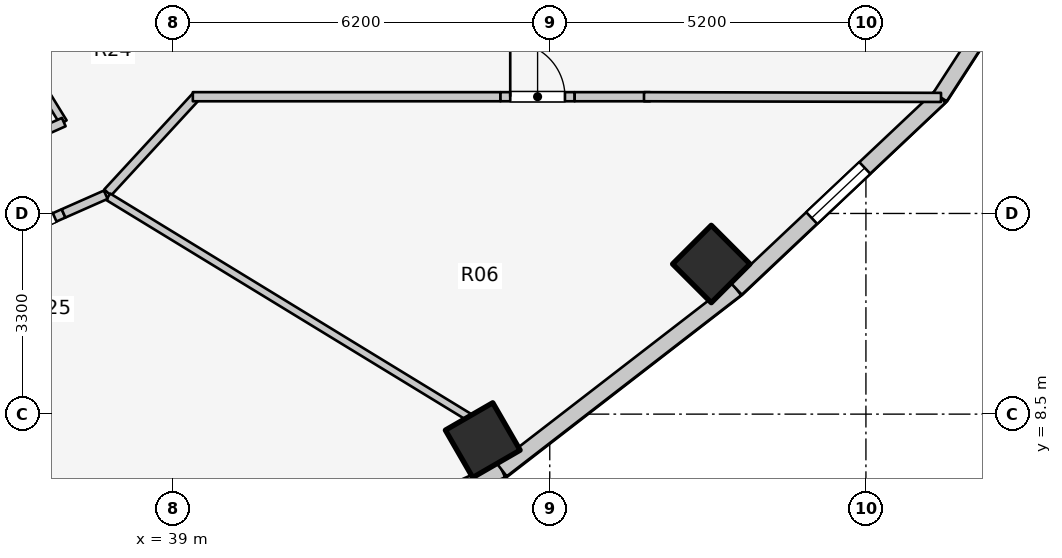
"""IFC4 building model, lengths in metres.
Left out: names, types, materials, properties, quantities, classifications, styles, units other than length and angle.
Written with IfcOpenShell. Run it as: python <this file> out.ifc"""

import sys

from ifc_helpers import new_model, si_unit, direction, frame, frame_2d, origin, origin_2d, place, context, subcontext, project, spatial, rectangle, extrude, element, fill, save


model = new_model("IFC4")
c1 = context("Model", 3, precision=1e-05, world=origin(), true_north=direction((0.0, 1.0)))
c2 = subcontext(c1, "Body", "Model", "MODEL_VIEW")
j1 = project(units=[si_unit("LENGTHUNIT", "METRE"), si_unit("PLANEANGLEUNIT", "RADIAN")], contexts=[c1])
p1 = place(None, origin())
s1 = spatial("IfcSite", under=j1, at=p1, CompositionType="ELEMENT")
p2 = place(p1, origin())
s2 = spatial("IfcBuilding", under=s1, at=p2, CompositionType="ELEMENT")
p3 = place(p2, frame((0.0, 0.0, 177.7)))
s3 = spatial("IfcBuildingStorey", under=s2, at=p3, CompositionType="ELEMENT", Elevation=177.7)
for number, where, z_axis, x_axis in (
    (1, (44.098, 8.072, 0.0), (0.0, 0.0, 1.0), (0.5, -0.866, 0.0)),
    (2, (47.857, 10.969, 0.0), (0.0, 0.0, 1.0), (0.707, -0.707, 0.0)),
):
    element("IfcColumn", number, at=place(p3, frame(where, z_axis=z_axis, x_axis=x_axis)), inside=s3, PredefinedType="COLUMN", context=c2, shape_type="SweptSolid", body=[
        extrude(rectangle(XDim=0.9, YDim=0.9, at=origin_2d()), origin(), (0.0, 0.0, 1.0), 3.1),
    ])
p4 = place(p3, frame((39.365, 5.315, 0.0), z_axis=(0.0, 0.0, 1.0), x_axis=(0.912353637112, 0.409403029847, 0.0)))
e3 = element("IfcWall", 3, at=p4, inside=s3, PredefinedType="STANDARD", context=c2, shape_type="SweptSolid", body=[
    extrude(rectangle(XDim=5.533, YDim=0.26, at=frame_2d((2.766, 0.0))), origin(), (0.0, 0.0, 1.0), 1.22),
])
p5 = place(p4, frame((2.167, 0.0, 0.15)))
e4 = element("IfcOpeningElement", 4, at=p5, cuts=e3, PredefinedType="OPENING", context=c2, shape_type="SweptSolid", body=[
    extrude(rectangle(XDim=1.2, YDim=0.9, at=frame_2d((0.6, 0.45))), frame((0.0, 0.14, 0.0), z_axis=(0.0, -1.0, 0.0), x_axis=(1.0, 0.0, 0.0)), (0.0, 0.0, 1.0), 0.28),
])
p6 = place(p3, frame((44.413, 7.581, 0.0), z_axis=(0.0, 0.0, 1.0), x_axis=(0.791460185804, 0.611220724687, 0.0)))
e5 = element("IfcWall", 5, at=p6, inside=s3, PredefinedType="STANDARD", context=c2, shape_type="SweptSolid", body=[
    extrude(rectangle(XDim=4.872, YDim=0.26, at=frame_2d((2.436, 0.0))), origin(), (0.0, 0.0, 1.0), 1.22),
])
p7 = place(p3, frame((48.269, 10.559, 0.0), z_axis=(0.0, 0.0, 1.0), x_axis=(0.727667301037, 0.68593024354, 0.0)))
e6 = element("IfcWall", 6, at=p7, inside=s3, PredefinedType="STANDARD", context=c2, shape_type="SweptSolid", body=[
    extrude(rectangle(XDim=4.604, YDim=0.26, at=frame_2d((2.302, 0.0))), origin(), (0.0, 0.0, 1.0), 1.22),
])
p8 = place(p7, frame((1.702, 0.0, 0.15)))
e7 = element("IfcOpeningElement", 7, at=p8, cuts=e6, PredefinedType="OPENING", context=c2, shape_type="SweptSolid", body=[
    extrude(rectangle(XDim=1.2, YDim=0.9, at=frame_2d((0.6, 0.45))), frame((0.0, 0.14, 0.0), z_axis=(0.0, -1.0, 0.0), x_axis=(1.0, 0.0, 0.0)), (0.0, 0.0, 1.0), 0.28),
])
p9 = place(p3, frame((51.619, 13.716, 0.0), z_axis=(0.0, 0.0, 1.0), x_axis=(0.543358984534, 0.839500454989, 0.0)))
e8 = element("IfcWall", 8, at=p9, inside=s3, PredefinedType="STANDARD", context=c2, shape_type="SweptSolid", body=[
    extrude(rectangle(XDim=4.511, YDim=0.26, at=frame_2d((2.256, 0.0))), origin(), (0.0, 0.0, 1.0), 1.22),
])
p10 = place(p9, frame((1.656, 0.0, 0.15)))
e9 = element("IfcOpeningElement", 9, at=p10, cuts=e8, PredefinedType="OPENING", context=c2, shape_type="SweptSolid", body=[
    extrude(rectangle(XDim=1.2, YDim=0.9, at=frame_2d((0.6, 0.45))), frame((0.0, 0.14, 0.0), z_axis=(0.0, -1.0, 0.0), x_axis=(1.0, 0.0, 0.0)), (0.0, 0.0, 1.0), 0.28),
])
p11 = place(p3, frame((37.928, 12.144, 0.0), z_axis=(0.0, 0.0, 1.0), x_axis=(0.677579737957, 0.735449317567, 0.0)))
e10 = element("IfcWall", 10, at=p11, inside=s3, PredefinedType="PARTITIONING", context=c2, shape_type="SweptSolid", body=[
    extrude(rectangle(XDim=2.173, YDim=0.15, at=frame_2d((1.086, 0.0))), origin(), (0.0, 0.0, 1.0), 2.019),
])
p12 = place(p3, frame((39.33, 13.72, 0.0), z_axis=(0.0, 0.0, 1.0), x_axis=(1.0, 0.0, 0.0)))
e11 = element("IfcWall", 11, at=p12, inside=s3, PredefinedType="PARTITIONING", context=c2, shape_type="SweptSolid", body=[
    extrude(rectangle(XDim=5.06, YDim=0.15, at=frame_2d((2.53, 0.0))), origin(), (0.0, 0.0, 1.0), 2.019),
])
p13 = place(p3, frame((44.39, 13.72, 0.0), z_axis=(0.0, 0.0, 1.0), x_axis=(1.0, 0.0, 0.0)))
e12 = element("IfcWall", 12, at=p13, inside=s3, PredefinedType="PARTITIONING", context=c2, shape_type="SweptSolid", body=[
    extrude(rectangle(XDim=1.22, YDim=0.15, at=frame_2d((0.61, 0.0))), origin(), (0.0, 0.0, 1.0), 2.575),
])
p14 = place(p13, frame((0.16, 0.0, 0.0)))
e13 = element("IfcOpeningElement", 13, at=p14, cuts=e12, PredefinedType="OPENING", context=c2, shape_type="SweptSolid", body=[
    extrude(rectangle(XDim=0.9, YDim=2.1, at=frame_2d((0.45, 1.05))), frame((0.0, 0.085, 0.0), z_axis=(0.0, -1.0, 0.0), x_axis=(1.0, 0.0, 0.0)), (0.0, 0.0, 1.0), 0.17),
])
p15 = place(p3, frame((45.61, 13.72, 0.0), z_axis=(0.0, 0.0, 1.0), x_axis=(1.0, 0.0, 0.0)))
e14 = element("IfcWall", 14, at=p15, inside=s3, PredefinedType="PARTITIONING", context=c2, shape_type="SweptSolid", body=[
    extrude(rectangle(XDim=1.24, YDim=0.15, at=frame_2d((0.62, 0.0))), origin(), (0.0, 0.0, 1.0), 2.575),
])
p16 = place(p3, frame((46.75, 13.72, 0.0), z_axis=(0.0, 0.0, 1.0), x_axis=(0.999997122315, -0.00239903348, 0.0)))
e15 = element("IfcWall", 15, at=p16, inside=s3, PredefinedType="PARTITIONING", context=c2, shape_type="SweptSolid", body=[
    extrude(rectangle(XDim=4.885, YDim=0.15, at=frame_2d((2.442, 0.0))), origin(), (0.0, 0.0, 1.0), 1.22),
])
p17 = place(p3, frame((35.55, 15.985, 0.0), z_axis=(0.0, 0.0, 1.0), x_axis=(0.523587550846, -0.851971875474, 0.0)))
e16 = element("IfcWall", 16, at=p17, inside=s3, PredefinedType="PARTITIONING", context=c2, shape_type="SweptSolid", body=[
    extrude(rectangle(XDim=3.153, YDim=0.125, at=frame_2d((1.577, 0.0))), origin(), (0.0, 0.0, 1.0), 2.019),
])
p18 = place(p3, frame((36.529, 13.0, 0.0), z_axis=(0.0, 0.0, 1.0), x_axis=(0.913092011598, 0.407753575528, 0.0)))
e17 = element("IfcWall", 17, at=p18, inside=s3, PredefinedType="PARTITIONING", context=c2, shape_type="SweptSolid", body=[
    extrude(rectangle(XDim=0.743, YDim=0.15, at=frame_2d((0.372, 0.0))), origin(), (0.0, 0.0, 1.0), 2.575),
])
p19 = place(p3, frame((37.938, 12.075, 0.0), z_axis=(0.0, 0.0, 1.0), x_axis=(0.853440334679, -0.521190555501, 0.0)))
e18 = element("IfcWall", 18, at=p19, inside=s3, PredefinedType="PARTITIONING", context=c2, shape_type="SweptSolid", body=[
    extrude(rectangle(XDim=6.966, YDim=0.125, at=frame_2d((3.483, 0.0))), origin(), (0.0, 0.0, 1.0), 1.22),
])
p20 = place(p3, frame((35.997, 11.267, 0.0), z_axis=(0.0, 0.0, 1.0), x_axis=(0.914549810084, 0.404473293155, 0.0)))
e19 = element("IfcWall", 19, at=p20, inside=s3, PredefinedType="PARTITIONING", context=c2, shape_type="SweptSolid", body=[
    extrude(rectangle(XDim=1.32, YDim=0.15, at=frame_2d((0.66, 0.0))), origin(), (0.0, 0.0, 1.0), 2.16),
])
p21 = place(p20, frame((0.16, 0.0, 0.0)))
e20 = element("IfcOpeningElement", 20, at=p21, cuts=e19, PredefinedType="OPENING", context=c2, shape_type="SweptSolid", body=[
    extrude(rectangle(XDim=1.0, YDim=2.1, at=frame_2d((0.5, 1.05))), frame((0.0, 0.085, 0.0), z_axis=(0.0, -1.0, 0.0), x_axis=(1.0, 0.0, 0.0)), (0.0, 0.0, 1.0), 0.17),
])
p22 = place(p3, frame((37.204, 11.801, 0.0), z_axis=(0.0, 0.0, 1.0), x_axis=(0.914526186943, 0.404526702945, 0.0)))
e21 = element("IfcWall", 21, at=p22, inside=s3, PredefinedType="PARTITIONING", context=c2, shape_type="SweptSolid", body=[
    extrude(rectangle(XDim=0.759, YDim=0.15, at=frame_2d((0.38, 0.0))), origin(), (0.0, 0.0, 1.0), 2.575),
])
p23 = place(p8, origin())
e22 = element("IfcWindow", 22, at=p23, inside=s3, PartitioningType="SINGLE_PANEL", PredefinedType="WINDOW", context=c2, shape_type="SweptSolid", body=[
    extrude(rectangle(XDim=1.2, YDim=0.9, at=frame_2d((0.6, 0.45))), frame((0.0, 0.03, 0.0), z_axis=(0.0, -1.0, 0.0), x_axis=(1.0, 0.0, 0.0)), (0.0, 0.0, 1.0), 0.06),
])
fill(e7, e22)
p24 = place(p14, origin())
e23 = element("IfcDoor", 23, at=p24, inside=s3, OperationType="SINGLE_SWING_LEFT", PredefinedType="DOOR", context=c2, shape_type="SweptSolid", body=[
    extrude(rectangle(XDim=0.9, YDim=2.1, at=frame_2d((0.45, 1.05))), frame((0.0, 0.025, 0.0), z_axis=(0.0, -1.0, 0.0), x_axis=(1.0, 0.0, 0.0)), (0.0, 0.0, 1.0), 0.05),
])
fill(e13, e23)
p25 = place(p21, origin())
e24 = element("IfcDoor", 24, at=p25, inside=s3, OperationType="SINGLE_SWING_LEFT", PredefinedType="DOOR", context=c2, shape_type="SweptSolid", body=[
    extrude(rectangle(XDim=1.0, YDim=2.1, at=frame_2d((0.5, 1.05))), frame((0.0, 0.025, 0.0), z_axis=(0.0, -1.0, 0.0), x_axis=(1.0, 0.0, 0.0)), (0.0, 0.0, 1.0), 0.05),
])
fill(e20, e24)
save(model, sys.argv[1])
